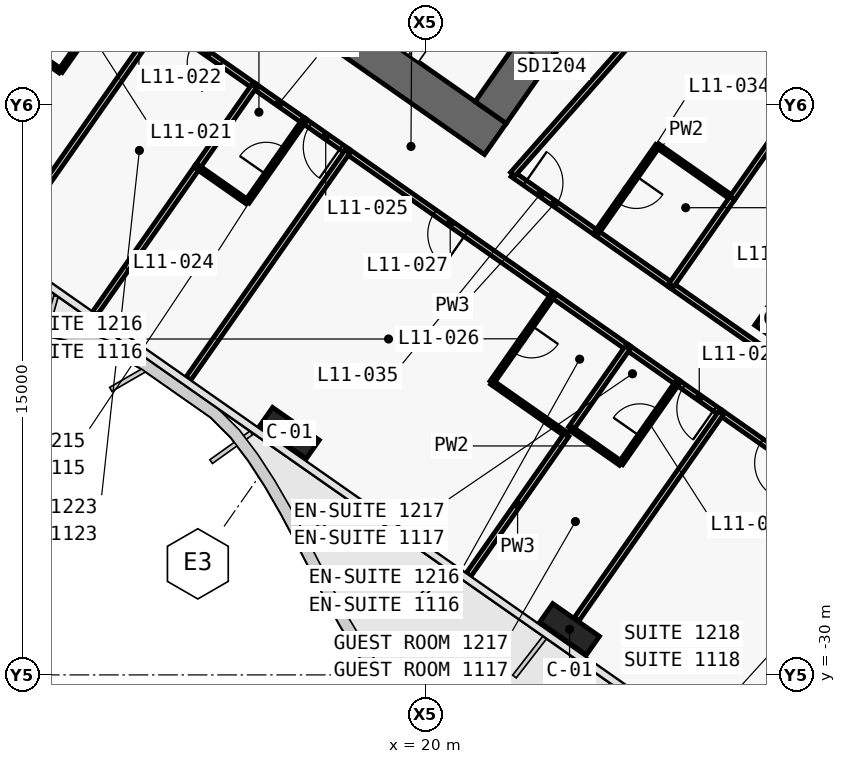
"""IFC4 building model, lengths in metres.
Left out: names, types, materials, properties, quantities, classifications, styles, units other than length and angle.
Written with IfcOpenShell. Run it as: python <this file> out.ifc"""

import sys

from ifc_helpers import new_model, si_unit, direction, frame, frame_2d, origin, origin_2d, place, context, subcontext, project, spatial, polyline, rectangle, outline, extrude, element, fill, save


model = new_model("IFC4")
c1 = context("Model", 3, precision=1e-05, world=origin(), true_north=direction((0.0, 1.0)))
c2 = subcontext(c1, "Body", "Model", "MODEL_VIEW")
j1 = project(units=[si_unit("LENGTHUNIT", "METRE"), si_unit("PLANEANGLEUNIT", "RADIAN")], contexts=[c1])
p1 = place(None, origin())
s1 = spatial("IfcSite", under=j1, at=p1, CompositionType="ELEMENT")
p2 = place(p1, origin())
s2 = spatial("IfcBuilding", under=s1, at=p2, CompositionType="ELEMENT")
p3 = place(p2, frame((0.0, 0.0, 65.3)))
s3 = spatial("IfcBuildingStorey", under=s2, at=p3, CompositionType="ELEMENT", Elevation=65.3)
p4 = place(p3, frame((-0.037, -0.585, 0.0), z_axis=(0.0, 0.0, 1.0), x_axis=(0.819157152511, -0.573569140985, 0.0)))
e1 = element("IfcWall", 1, at=p4, inside=s3, PredefinedType="SHEAR", context=c2, shape_type="SweptSolid", body=[
    extrude(outline(polyline([(26.695, 0.5), (0.0, 0.5), (0.7, -0.5), (26.695, -0.5), (26.695, 0.5)])), origin(), (0.0, 0.0, 1.0), 3.6),
])
p5 = place(p4, frame((1.245, 0.0, 0.0)))
e2 = element("IfcOpeningElement", 2, at=p5, cuts=e1, PredefinedType="OPENING", context=c2, shape_type="SweptSolid", body=[
    extrude(rectangle(XDim=1.5, YDim=2.1, at=frame_2d((0.75, 1.05))), frame((0.0, 0.51, 0.0), z_axis=(0.0, -1.0, 0.0), x_axis=(1.0, 0.0, 0.0)), (0.0, 0.0, 1.0), 1.02),
])
p6 = place(p4, frame((12.445, 0.0, 0.0)))
e3 = element("IfcOpeningElement", 3, at=p6, cuts=e1, PredefinedType="OPENING", context=c2, shape_type="SweptSolid", body=[
    extrude(rectangle(XDim=1.5, YDim=2.1, at=frame_2d((0.75, 1.05))), frame((0.0, 0.51, 0.0), z_axis=(0.0, -1.0, 0.0), x_axis=(1.0, 0.0, 0.0)), (0.0, 0.0, 1.0), 1.02),
])
p7 = place(p3, frame((21.708, -15.2, 0.0), z_axis=(0.0, 0.0, 1.0), x_axis=(0.573576324356, 0.819152122709, 0.0)))
e4 = element("IfcWall", 4, at=p7, inside=s3, PredefinedType="SHEAR", context=c2, shape_type="SweptSolid", body=[
    extrude(outline(polyline([(9.2, 0.5), (0.0, 0.5), (0.0, -0.5), (9.2, -0.5), (9.2, 0.5)])), origin(), (0.0, 0.0, 1.0), 3.6),
])
p8 = place(p7, frame((6.1, 0.0, 0.0)))
e5 = element("IfcOpeningElement", 5, at=p8, cuts=e4, PredefinedType="OPENING", context=c2, shape_type="SweptSolid", body=[
    extrude(rectangle(XDim=1.8, YDim=2.1, at=frame_2d((0.9, 1.05))), frame((0.0, 0.51, 0.0), z_axis=(0.0, -1.0, 0.0), x_axis=(1.0, 0.0, 0.0)), (0.0, 0.0, 1.0), 1.02),
])
p9 = place(p7, frame((1.9, 0.0, 0.0)))
e6 = element("IfcOpeningElement", 6, at=p9, cuts=e4, PredefinedType="OPENING", context=c2, shape_type="SweptSolid", body=[
    extrude(rectangle(XDim=1.8, YDim=2.1, at=frame_2d((0.9, 1.05))), frame((0.0, 0.51, 0.0), z_axis=(0.0, -1.0, 0.0), x_axis=(1.0, 0.0, 0.0)), (0.0, 0.0, 1.0), 1.02),
])
for number, where, z_axis, x_axis in (
    (7, (16.41, -23.637, 0.0), (0.0, 0.0, 1.0), (0.819, -0.574, 0.0)),
    (8, (23.782, -28.799, 0.0), (0.0, 0.0, 1.0), (0.819, -0.574, 0.0)),
):
    element("IfcColumn", number, at=place(p3, frame(where, z_axis=z_axis, x_axis=x_axis)), inside=s3, PredefinedType="COLUMN", context=c2, shape_type="SweptSolid", body=[
        extrude(rectangle(XDim=1.5, YDim=0.6, at=origin_2d()), origin(), (0.0, 0.0, 1.0), 3.6),
    ])
p10 = place(p3, frame((29.49, -20.649, 0.0), z_axis=(0.0, 0.0, 1.0), x_axis=(0.819152044289, -0.573576436351, 0.0)))
e9 = element("IfcColumn", 9, at=p10, inside=s3, PredefinedType="COLUMN", context=c2, shape_type="SweptSolid", body=[
    extrude(rectangle(XDim=1.2, YDim=1.2, at=origin_2d()), origin(), (0.0, 0.0, 1.0), 3.6),
])
p11 = place(p3, frame((22.284, -16.824, 0.0), z_axis=(0.0, 0.0, 1.0), x_axis=(0.819176640776, -0.573541307325, 0.0)))
e10 = element("IfcWall", 10, at=p11, inside=s3, PredefinedType="PARTITIONING", context=c2, shape_type="SweptSolid", body=[
    extrude(rectangle(XDim=2.698, YDim=0.15, at=frame_2d((1.349, 0.0))), origin(), (0.0, 0.0, 1.0), 3.32),
])
p12 = place(p11, frame((0.396, 0.0, 0.0)))
e11 = element("IfcOpeningElement", 11, at=p12, cuts=e10, PredefinedType="OPENING", context=c2, shape_type="SweptSolid", body=[
    extrude(rectangle(XDim=1.0, YDim=2.1, at=frame_2d((0.5, 1.05))), frame((0.0, 0.085, 0.0), z_axis=(0.0, -1.0, 0.0), x_axis=(1.0, 0.0, 0.0)), (0.0, 0.0, 1.0), 0.17),
])
p13 = place(p3, frame((24.491, -18.369, 0.0), z_axis=(0.0, 0.0, 1.0), x_axis=(0.819179439794, -0.573537309527, 0.0)))
e12 = element("IfcWall", 12, at=p13, inside=s3, PredefinedType="PARTITIONING", context=c2, shape_type="SweptSolid", body=[
    extrude(rectangle(XDim=2.404, YDim=0.15, at=frame_2d((1.202, 0.0))), origin(), (0.0, 0.0, 1.0), 3.32),
])
p14 = place(p3, frame((26.457, -19.746, 0.0), z_axis=(0.0, 0.0, 1.0), x_axis=(0.819165052243, -0.573557858619, 0.0)))
e13 = element("IfcWall", 13, at=p14, inside=s3, PredefinedType="PARTITIONING", context=c2, shape_type="SweptSolid", body=[
    extrude(rectangle(XDim=6.004, YDim=0.15, at=frame_2d((3.002, 0.0))), origin(), (0.0, 0.0, 1.0), 2.6),
])
p15 = place(p14, frame((4.552, 0.0, 0.0)))
e14 = element("IfcOpeningElement", 14, at=p15, cuts=e13, PredefinedType="OPENING", context=c2, shape_type="SweptSolid", body=[
    extrude(rectangle(XDim=0.9, YDim=2.1, at=frame_2d((0.45, 1.05))), frame((0.0, 0.085, 0.0), z_axis=(0.0, -1.0, 0.0), x_axis=(1.0, 0.0, 0.0)), (0.0, 0.0, 1.0), 0.17),
])
p16 = place(p3, frame((15.483, -14.504, 0.0), z_axis=(0.0, 0.0, 1.0), x_axis=(-0.81916700466, 0.573555070134, 0.0)))
e15 = element("IfcWall", 15, at=p16, inside=s3, PredefinedType="PARTITIONING", context=c2, shape_type="SweptSolid", body=[
    extrude(rectangle(XDim=3.004, YDim=0.15, at=frame_2d((1.502, 0.0))), origin(), (0.0, 0.0, 1.0), 2.6),
])
p17 = place(p16, frame((1.052, 0.0, 0.0)))
e16 = element("IfcOpeningElement", 16, at=p17, cuts=e15, PredefinedType="OPENING", context=c2, shape_type="SweptSolid", body=[
    extrude(rectangle(XDim=0.9, YDim=2.1, at=frame_2d((0.45, 1.05))), frame((0.0, 0.085, 0.0), z_axis=(0.0, -1.0, 0.0), x_axis=(1.0, 0.0, 0.0)), (0.0, 0.0, 1.0), 0.17),
])
p18 = place(p3, frame((17.941, -16.224, 0.0), z_axis=(0.0, 0.0, 1.0), x_axis=(-0.819199220913, 0.573509055252, 0.0)))
e17 = element("IfcWall", 17, at=p18, inside=s3, PredefinedType="PARTITIONING", context=c2, shape_type="SweptSolid", body=[
    extrude(rectangle(XDim=1.403, YDim=0.15, at=frame_2d((0.702, 0.0))), origin(), (0.0, 0.0, 1.0), 3.32),
])
p19 = place(p18, frame((0.202, 0.0, 0.0)))
e18 = element("IfcOpeningElement", 18, at=p19, cuts=e17, PredefinedType="OPENING", context=c2, shape_type="SweptSolid", body=[
    extrude(rectangle(XDim=1.0, YDim=2.1, at=frame_2d((0.5, 1.05))), frame((0.0, 0.085, 0.0), z_axis=(0.0, -1.0, 0.0), x_axis=(1.0, 0.0, 0.0)), (0.0, 0.0, 1.0), 0.17),
])
p20 = place(p3, frame((16.794, -15.421, 0.0), z_axis=(0.0, 0.0, 1.0), x_axis=(-0.819189013667, 0.573523634986, 0.0)))
e19 = element("IfcWall", 19, at=p20, inside=s3, PredefinedType="PARTITIONING", context=c2, shape_type="SweptSolid", body=[
    extrude(rectangle(XDim=1.604, YDim=0.15, at=frame_2d((0.802, 0.0))), origin(), (0.0, 0.0, 1.0), 3.32),
])
p21 = place(p3, frame((23.346, -20.01, 0.0), z_axis=(0.0, 0.0, 1.0), x_axis=(-0.819153746897, 0.573574004767, 0.0)))
e20 = element("IfcWall", 20, at=p21, inside=s3, PredefinedType="PARTITIONING", context=c2, shape_type="SweptSolid", body=[
    extrude(rectangle(XDim=6.603, YDim=0.15, at=frame_2d((3.302, 0.0))), origin(), (0.0, 0.0, 1.0), 2.6),
])
p22 = place(p21, frame((2.801, 0.0, 0.0)))
e21 = element("IfcOpeningElement", 21, at=p22, cuts=e20, PredefinedType="OPENING", context=c2, shape_type="SweptSolid", body=[
    extrude(rectangle(XDim=1.0, YDim=2.1, at=frame_2d((0.5, 1.05))), frame((0.0, 0.085, 0.0), z_axis=(0.0, -1.0, 0.0), x_axis=(1.0, 0.0, 0.0)), (0.0, 0.0, 1.0), 0.17),
])
p23 = place(p3, frame((25.313, -21.387, 0.0), z_axis=(0.0, 0.0, 1.0), x_axis=(-0.819146032251, 0.573585022335, 0.0)))
e22 = element("IfcWall", 22, at=p23, inside=s3, PredefinedType="PARTITIONING", context=c2, shape_type="SweptSolid", body=[
    extrude(rectangle(XDim=2.404, YDim=0.15, at=frame_2d((1.202, 0.0))), origin(), (0.0, 0.0, 1.0), 3.32),
])
p24 = place(p3, frame((27.771, -23.107, 0.0), z_axis=(0.0, 0.0, 1.0), x_axis=(-0.819117471667, 0.573625808005, 0.0)))
e23 = element("IfcWall", 23, at=p24, inside=s3, PredefinedType="PARTITIONING", context=c2, shape_type="SweptSolid", body=[
    extrude(rectangle(XDim=1.403, YDim=0.15, at=frame_2d((0.702, 0.0))), origin(), (0.0, 0.0, 1.0), 2.6),
])
p25 = place(p24, frame((0.202, 0.0, 0.0)))
e24 = element("IfcOpeningElement", 24, at=p25, cuts=e23, PredefinedType="OPENING", context=c2, shape_type="SweptSolid", body=[
    extrude(rectangle(XDim=1.0, YDim=2.1, at=frame_2d((0.5, 1.05))), frame((0.0, 0.085, 0.0), z_axis=(0.0, -1.0, 0.0), x_axis=(1.0, 0.0, 0.0)), (0.0, 0.0, 1.0), 0.17),
])
p26 = place(p3, frame((26.624, -22.304, 0.0), z_axis=(0.0, 0.0, 1.0), x_axis=(-0.819189013667, 0.573523634986, 0.0)))
e25 = element("IfcWall", 25, at=p26, inside=s3, PredefinedType="PARTITIONING", context=c2, shape_type="SweptSolid", body=[
    extrude(rectangle(XDim=1.604, YDim=0.15, at=frame_2d((0.802, 0.0))), origin(), (0.0, 0.0, 1.0), 3.32),
])
p27 = place(p3, frame((30.719, -25.172, 0.0), z_axis=(0.0, 0.0, 1.0), x_axis=(-0.819145961204, 0.573585123798, 0.0)))
e26 = element("IfcWall", 26, at=p27, inside=s3, PredefinedType="PARTITIONING", context=c2, shape_type="SweptSolid", body=[
    extrude(rectangle(XDim=3.603, YDim=0.15, at=frame_2d((1.802, 0.0))), origin(), (0.0, 0.0, 1.0), 2.6),
])
p28 = place(p27, frame((1.301, 0.0, 0.0)))
e27 = element("IfcOpeningElement", 27, at=p28, cuts=e26, PredefinedType="OPENING", context=c2, shape_type="SweptSolid", body=[
    extrude(rectangle(XDim=1.0, YDim=2.1, at=frame_2d((0.5, 1.05))), frame((0.0, 0.085, 0.0), z_axis=(0.0, -1.0, 0.0), x_axis=(1.0, 0.0, 0.0)), (0.0, 0.0, 1.0), 0.17),
])
p29 = place(p3, frame((26.098, -16.076, 0.0), z_axis=(0.0, 0.0, 1.0), x_axis=(-0.573550118428, -0.819170471667, 0.0)))
e28 = element("IfcWall", 28, at=p29, inside=s3, PredefinedType="PARTITIONING", context=c2, shape_type="SweptSolid", body=[
    extrude(rectangle(XDim=2.8, YDim=0.12, at=frame_2d((1.4, 0.0))), origin(), (0.0, 0.0, 1.0), 2.6),
])
p30 = place(p29, frame((0.975, 0.0, 0.0)))
e29 = element("IfcOpeningElement", 29, at=p30, cuts=e28, PredefinedType="OPENING", context=c2, shape_type="SweptSolid", body=[
    extrude(rectangle(XDim=0.85, YDim=2.05, at=frame_2d((0.425, 1.025))), frame((0.0, 0.07, 0.0), z_axis=(0.0, -1.0, 0.0), x_axis=(1.0, 0.0, 0.0)), (0.0, 0.0, 1.0), 0.14),
])
p31 = place(p3, frame((28.065, -17.453, 0.0), z_axis=(0.0, 0.0, 1.0), x_axis=(-0.819155442668, 0.573571582932, 0.0)))
e30 = element("IfcWall", 30, at=p31, inside=s3, PredefinedType="PARTITIONING", context=c2, shape_type="SweptSolid", body=[
    extrude(rectangle(XDim=2.4, YDim=0.12, at=frame_2d((1.2, 0.0))), origin(), (0.0, 0.0, 1.0), 3.32),
])
p32 = place(p3, frame((32.94, -10.491, 0.0), z_axis=(0.0, 0.0, 1.0), x_axis=(-0.573593433868, -0.819140142237, 0.0)))
e31 = element("IfcWall", 31, at=p32, inside=s3, PredefinedType="PARTITIONING", context=c2, shape_type="SweptSolid", body=[
    extrude(rectangle(XDim=8.499, YDim=0.15, at=frame_2d((4.25, 0.0))), origin(), (0.0, 0.0, 1.0), 2.6),
])
p33 = place(p3, frame((22.285, -16.825, 0.0), z_axis=(0.0, 0.0, 1.0), x_axis=(0.661551268245, 0.749899939647, 0.0)))
e32 = element("IfcWall", 32, at=p33, inside=s3, PredefinedType="PARTITIONING", context=c2, shape_type="SweptSolid", body=[
    extrude(rectangle(XDim=6.541, YDim=0.15, at=frame_2d((3.271, 0.0))), origin(), (0.0, 0.0, 1.0), 2.6),
])
p34 = place(p3, frame((28.064, -17.454, 0.0), z_axis=(0.0, 0.0, 1.0), x_axis=(-0.573550118428, -0.819170471667, 0.0)))
e33 = element("IfcWall", 33, at=p34, inside=s3, PredefinedType="PARTITIONING", context=c2, shape_type="SweptSolid", body=[
    extrude(rectangle(XDim=2.8, YDim=0.15, at=frame_2d((1.4, 0.0))), origin(), (0.0, 0.0, 1.0), 2.6),
])
p35 = place(p3, frame((9.075, -13.192, 0.0), z_axis=(0.0, 0.0, 1.0), x_axis=(0.819131543282, -0.57360571371, 0.0)))
e34 = element("IfcWall", 34, at=p35, inside=s3, PredefinedType="PARTITIONING", context=c2, shape_type="SweptSolid", body=[
    extrude(rectangle(XDim=1.6, YDim=0.12, at=frame_2d((0.8, 0.0))), origin(), (0.0, 0.0, 1.0), 3.32),
])
p36 = place(p3, frame((10.387, -14.109, 0.0), z_axis=(0.0, 0.0, 1.0), x_axis=(0.573582085028, 0.819148089014, 0.0)))
e35 = element("IfcWall", 35, at=p36, inside=s3, PredefinedType="PARTITIONING", context=c2, shape_type="SweptSolid", body=[
    extrude(rectangle(XDim=2.6, YDim=0.12, at=frame_2d((1.3, 0.0))), origin(), (0.0, 0.0, 1.0), 3.32),
])
p37 = place(p36, frame((0.875, 0.0, 0.0)))
e36 = element("IfcOpeningElement", 36, at=p37, cuts=e35, PredefinedType="OPENING", context=c2, shape_type="SweptSolid", body=[
    extrude(rectangle(XDim=0.85, YDim=2.05, at=frame_2d((0.425, 1.025))), frame((0.0, 0.07, 0.0), z_axis=(0.0, -1.0, 0.0), x_axis=(1.0, 0.0, 0.0)), (0.0, 0.0, 1.0), 0.14),
])
p38 = place(p3, frame((13.024, -12.782, 0.0), z_axis=(0.0, 0.0, 1.0), x_axis=(-0.573556251799, -0.819166177294, 0.0)))
e37 = element("IfcWall", 37, at=p38, inside=s3, PredefinedType="PARTITIONING", context=c2, shape_type="SweptSolid", body=[
    extrude(rectangle(XDim=6.63, YDim=0.15, at=frame_2d((3.315, 0.0))), origin(), (0.0, 0.0, 1.0), 2.6),
])
p39 = place(p3, frame((13.991, -16.632, 0.0), z_axis=(0.0, 0.0, 1.0), x_axis=(-0.573563420358, -0.819161158032, 0.0)))
e38 = element("IfcWall", 38, at=p39, inside=s3, PredefinedType="PARTITIONING", context=c2, shape_type="SweptSolid", body=[
    extrude(rectangle(XDim=4.701, YDim=0.15, at=frame_2d((2.351, 0.0))), origin(), (0.0, 0.0, 1.0), 2.5),
])
p40 = place(p3, frame((15.481, -14.503, 0.0), z_axis=(0.0, 0.0, 1.0), x_axis=(-0.573588285102, -0.819143747577, 0.0)))
e39 = element("IfcWall", 39, at=p40, inside=s3, PredefinedType="PARTITIONING", context=c2, shape_type="SweptSolid", body=[
    extrude(rectangle(XDim=2.602, YDim=0.15, at=frame_2d((1.301, 0.0))), origin(), (0.0, 0.0, 1.0), 3.32),
])
p41 = place(p3, frame((13.99, -16.633, 0.0), z_axis=(0.0, 0.0, 1.0), x_axis=(0.819253425856, -0.573431621227, 0.0)))
e40 = element("IfcWall", 40, at=p41, inside=s3, PredefinedType="PARTITIONING", context=c2, shape_type="SweptSolid", body=[
    extrude(rectangle(XDim=1.6, YDim=0.12, at=frame_2d((0.8, 0.0))), origin(), (0.0, 0.0, 1.0), 3.32),
])
p42 = place(p3, frame((15.302, -17.551, 0.0), z_axis=(0.0, 0.0, 1.0), x_axis=(0.573600972199, 0.819134863556, 0.0)))
e41 = element("IfcWall", 41, at=p42, inside=s3, PredefinedType="PARTITIONING", context=c2, shape_type="SweptSolid", body=[
    extrude(rectangle(XDim=2.6, YDim=0.12, at=frame_2d((1.3, 0.0))), origin(), (0.0, 0.0, 1.0), 3.32),
])
p43 = place(p42, frame((0.875, 0.0, 0.0)))
e42 = element("IfcOpeningElement", 42, at=p43, cuts=e41, PredefinedType="OPENING", context=c2, shape_type="SweptSolid", body=[
    extrude(rectangle(XDim=0.85, YDim=2.05, at=frame_2d((0.425, 1.025))), frame((0.0, 0.07, 0.0), z_axis=(0.0, -1.0, 0.0), x_axis=(1.0, 0.0, 0.0)), (0.0, 0.0, 1.0), 0.14),
])
p44 = place(p3, frame((17.939, -16.223, 0.0), z_axis=(0.0, 0.0, 1.0), x_axis=(-0.573594765376, -0.819139209862, 0.0)))
e43 = element("IfcWall", 43, at=p44, inside=s3, PredefinedType="PARTITIONING", context=c2, shape_type="SweptSolid", body=[
    extrude(rectangle(XDim=7.3, YDim=0.15, at=frame_2d((3.65, 0.0))), origin(), (0.0, 0.0, 1.0), 2.5),
])
p45 = place(p3, frame((23.344, -20.008, 0.0), z_axis=(0.0, 0.0, 1.0), x_axis=(-0.573550118428, -0.819170471667, 0.0)))
e44 = element("IfcWall", 44, at=p45, inside=s3, PredefinedType="PARTITIONING", context=c2, shape_type="SweptSolid", body=[
    extrude(rectangle(XDim=2.8, YDim=0.12, at=frame_2d((1.4, 0.0))), origin(), (0.0, 0.0, 1.0), 3.32),
])
p46 = place(p45, frame((0.975, 0.0, 0.0)))
e45 = element("IfcOpeningElement", 45, at=p46, cuts=e44, PredefinedType="OPENING", context=c2, shape_type="SweptSolid", body=[
    extrude(rectangle(XDim=0.85, YDim=2.05, at=frame_2d((0.425, 1.025))), frame((0.0, 0.07, 0.0), z_axis=(0.0, -1.0, 0.0), x_axis=(1.0, 0.0, 0.0)), (0.0, 0.0, 1.0), 0.14),
])
p47 = place(p3, frame((21.739, -22.303, 0.0), z_axis=(0.0, 0.0, 1.0), x_axis=(0.819107643868, -0.573639841501, 0.0)))
e46 = element("IfcWall", 46, at=p47, inside=s3, PredefinedType="PARTITIONING", context=c2, shape_type="SweptSolid", body=[
    extrude(rectangle(XDim=2.4, YDim=0.12, at=frame_2d((1.2, 0.0))), origin(), (0.0, 0.0, 1.0), 3.32),
])
p48 = place(p3, frame((23.705, -23.68, 0.0), z_axis=(0.0, 0.0, 1.0), x_axis=(-0.573553393703, -0.819168178442, 0.0)))
e47 = element("IfcWall", 47, at=p48, inside=s3, PredefinedType="PARTITIONING", context=c2, shape_type="SweptSolid", body=[
    extrude(rectangle(XDim=4.499, YDim=0.15, at=frame_2d((2.25, 0.0))), origin(), (0.0, 0.0, 1.0), 2.5),
])
p49 = place(p3, frame((25.311, -21.385, 0.0), z_axis=(0.0, 0.0, 1.0), x_axis=(-0.573588285102, -0.819143747577, 0.0)))
e48 = element("IfcWall", 48, at=p49, inside=s3, PredefinedType="PARTITIONING", context=c2, shape_type="SweptSolid", body=[
    extrude(rectangle(XDim=2.602, YDim=0.15, at=frame_2d((1.301, 0.0))), origin(), (0.0, 0.0, 1.0), 3.32),
])
p50 = place(p3, frame((23.819, -23.516, 0.0), z_axis=(0.0, 0.0, 1.0), x_axis=(0.81918174131, -0.573534022273, 0.0)))
e49 = element("IfcWall", 49, at=p50, inside=s3, PredefinedType="PARTITIONING", context=c2, shape_type="SweptSolid", body=[
    extrude(rectangle(XDim=1.6, YDim=0.12, at=frame_2d((0.8, 0.0))), origin(), (0.0, 0.0, 1.0), 3.32),
])
p51 = place(p3, frame((25.132, -24.434, 0.0), z_axis=(0.0, 0.0, 1.0), x_axis=(0.573537965655, 0.819178980414, 0.0)))
e50 = element("IfcWall", 50, at=p51, inside=s3, PredefinedType="PARTITIONING", context=c2, shape_type="SweptSolid", body=[
    extrude(rectangle(XDim=2.6, YDim=0.12, at=frame_2d((1.3, 0.0))), origin(), (0.0, 0.0, 1.0), 3.32),
])
p52 = place(p51, frame((0.875, 0.0, 0.0)))
e51 = element("IfcOpeningElement", 51, at=p52, cuts=e50, PredefinedType="OPENING", context=c2, shape_type="SweptSolid", body=[
    extrude(rectangle(XDim=0.85, YDim=2.05, at=frame_2d((0.425, 1.025))), frame((0.0, 0.07, 0.0), z_axis=(0.0, -1.0, 0.0), x_axis=(1.0, 0.0, 0.0)), (0.0, 0.0, 1.0), 0.14),
])
p53 = place(p3, frame((27.769, -23.106, 0.0), z_axis=(0.0, 0.0, 1.0), x_axis=(-0.57359826181, -0.819136761505, 0.0)))
e52 = element("IfcWall", 52, at=p53, inside=s3, PredefinedType="PARTITIONING", context=c2, shape_type="SweptSolid", body=[
    extrude(rectangle(XDim=6.63, YDim=0.15, at=frame_2d((3.315, 0.0))), origin(), (0.0, 0.0, 1.0), 2.6),
])
p54 = place(p3, frame((31.077, -28.842, 0.0), z_axis=(0.0, 0.0, 1.0), x_axis=(-0.573564311442, -0.819160534108, 0.0)))
e53 = element("IfcWall", 53, at=p54, inside=s3, PredefinedType="PARTITIONING", context=c2, shape_type="SweptSolid", body=[
    extrude(rectangle(XDim=4.499, YDim=0.15, at=frame_2d((2.25, 0.0))), origin(), (0.0, 0.0, 1.0), 2.5),
])
p55 = place(p9, origin())
e54 = element("IfcDoor", 54, at=p55, inside=s3, OperationType="DOUBLE_DOOR_SINGLE_SWING", PredefinedType="DOOR", context=c2, shape_type="SweptSolid", body=[
    extrude(rectangle(XDim=1.8, YDim=2.1, at=frame_2d((0.9, 1.05))), frame((0.0, 0.025, 0.0), z_axis=(0.0, -1.0, 0.0), x_axis=(1.0, 0.0, 0.0)), (0.0, 0.0, 1.0), 0.05),
])
fill(e6, e54)
p56 = place(p17, origin())
e55 = element("IfcDoor", 55, at=p56, inside=s3, OperationType="SINGLE_SWING_RIGHT", PredefinedType="DOOR", context=c2, shape_type="SweptSolid", body=[
    extrude(rectangle(XDim=0.9, YDim=2.1, at=frame_2d((0.45, 1.05))), frame((0.0, 0.025, 0.0), z_axis=(0.0, -1.0, 0.0), x_axis=(1.0, 0.0, 0.0)), (0.0, 0.0, 1.0), 0.05),
])
fill(e16, e55)
p57 = place(p43, origin())
e56 = element("IfcDoor", 56, at=p57, inside=s3, OperationType="SINGLE_SWING_LEFT", PredefinedType="DOOR", context=c2, shape_type="SweptSolid", body=[
    extrude(rectangle(XDim=0.85, YDim=2.05, at=frame_2d((0.425, 1.025))), frame((0.0, 0.025, 0.0), z_axis=(0.0, -1.0, 0.0), x_axis=(1.0, 0.0, 0.0)), (0.0, 0.0, 1.0), 0.05),
])
fill(e42, e56)
p58 = place(p19, origin())
e57 = element("IfcDoor", 57, at=p58, inside=s3, OperationType="SINGLE_SWING_RIGHT", PredefinedType="DOOR", context=c2, shape_type="SweptSolid", body=[
    extrude(rectangle(XDim=1.0, YDim=2.1, at=frame_2d((0.5, 1.05))), frame((0.0, 0.025, 0.0), z_axis=(0.0, -1.0, 0.0), x_axis=(1.0, 0.0, 0.0)), (0.0, 0.0, 1.0), 0.05),
])
fill(e18, e57)
p59 = place(p46, origin())
e58 = element("IfcDoor", 58, at=p59, inside=s3, OperationType="SINGLE_SWING_RIGHT", PredefinedType="DOOR", context=c2, shape_type="SweptSolid", body=[
    extrude(rectangle(XDim=0.85, YDim=2.05, at=frame_2d((0.425, 1.025))), frame((0.0, 0.025, 0.0), z_axis=(0.0, -1.0, 0.0), x_axis=(1.0, 0.0, 0.0)), (0.0, 0.0, 1.0), 0.05),
])
fill(e45, e58)
p60 = place(p22, origin())
e59 = element("IfcDoor", 59, at=p60, inside=s3, OperationType="SINGLE_SWING_RIGHT", PredefinedType="DOOR", context=c2, shape_type="SweptSolid", body=[
    extrude(rectangle(XDim=1.0, YDim=2.1, at=frame_2d((0.5, 1.05))), frame((0.0, 0.025, 0.0), z_axis=(0.0, -1.0, 0.0), x_axis=(1.0, 0.0, 0.0)), (0.0, 0.0, 1.0), 0.05),
])
fill(e21, e59)
p61 = place(p52, origin())
e60 = element("IfcDoor", 60, at=p61, inside=s3, OperationType="SINGLE_SWING_LEFT", PredefinedType="DOOR", context=c2, shape_type="SweptSolid", body=[
    extrude(rectangle(XDim=0.85, YDim=2.05, at=frame_2d((0.425, 1.025))), frame((0.0, 0.025, 0.0), z_axis=(0.0, -1.0, 0.0), x_axis=(1.0, 0.0, 0.0)), (0.0, 0.0, 1.0), 0.05),
])
fill(e51, e60)
p62 = place(p25, origin())
e61 = element("IfcDoor", 61, at=p62, inside=s3, OperationType="SINGLE_SWING_RIGHT", PredefinedType="DOOR", context=c2, shape_type="SweptSolid", body=[
    extrude(rectangle(XDim=1.0, YDim=2.1, at=frame_2d((0.5, 1.05))), frame((0.0, 0.025, 0.0), z_axis=(0.0, -1.0, 0.0), x_axis=(1.0, 0.0, 0.0)), (0.0, 0.0, 1.0), 0.05),
])
fill(e24, e61)
p63 = place(p28, origin())
e62 = element("IfcDoor", 62, at=p63, inside=s3, OperationType="SINGLE_SWING_LEFT", PredefinedType="DOOR", context=c2, shape_type="SweptSolid", body=[
    extrude(rectangle(XDim=1.0, YDim=2.1, at=frame_2d((0.5, 1.05))), frame((0.0, 0.025, 0.0), z_axis=(0.0, -1.0, 0.0), x_axis=(1.0, 0.0, 0.0)), (0.0, 0.0, 1.0), 0.05),
])
fill(e27, e62)
p64 = place(p30, origin())
e63 = element("IfcDoor", 63, at=p64, inside=s3, OperationType="SINGLE_SWING_RIGHT", PredefinedType="DOOR", context=c2, shape_type="SweptSolid", body=[
    extrude(rectangle(XDim=0.85, YDim=2.05, at=frame_2d((0.425, 1.025))), frame((0.0, 0.025, 0.0), z_axis=(0.0, -1.0, 0.0), x_axis=(1.0, 0.0, 0.0)), (0.0, 0.0, 1.0), 0.05),
])
fill(e29, e63)
p65 = place(p12, origin())
e64 = element("IfcDoor", 64, at=p65, inside=s3, OperationType="SINGLE_SWING_LEFT", PredefinedType="DOOR", context=c2, shape_type="SweptSolid", body=[
    extrude(rectangle(XDim=1.0, YDim=2.1, at=frame_2d((0.5, 1.05))), frame((0.0, 0.025, 0.0), z_axis=(0.0, -1.0, 0.0), x_axis=(1.0, 0.0, 0.0)), (0.0, 0.0, 1.0), 0.05),
])
fill(e11, e64)
save(model, sys.argv[1])
